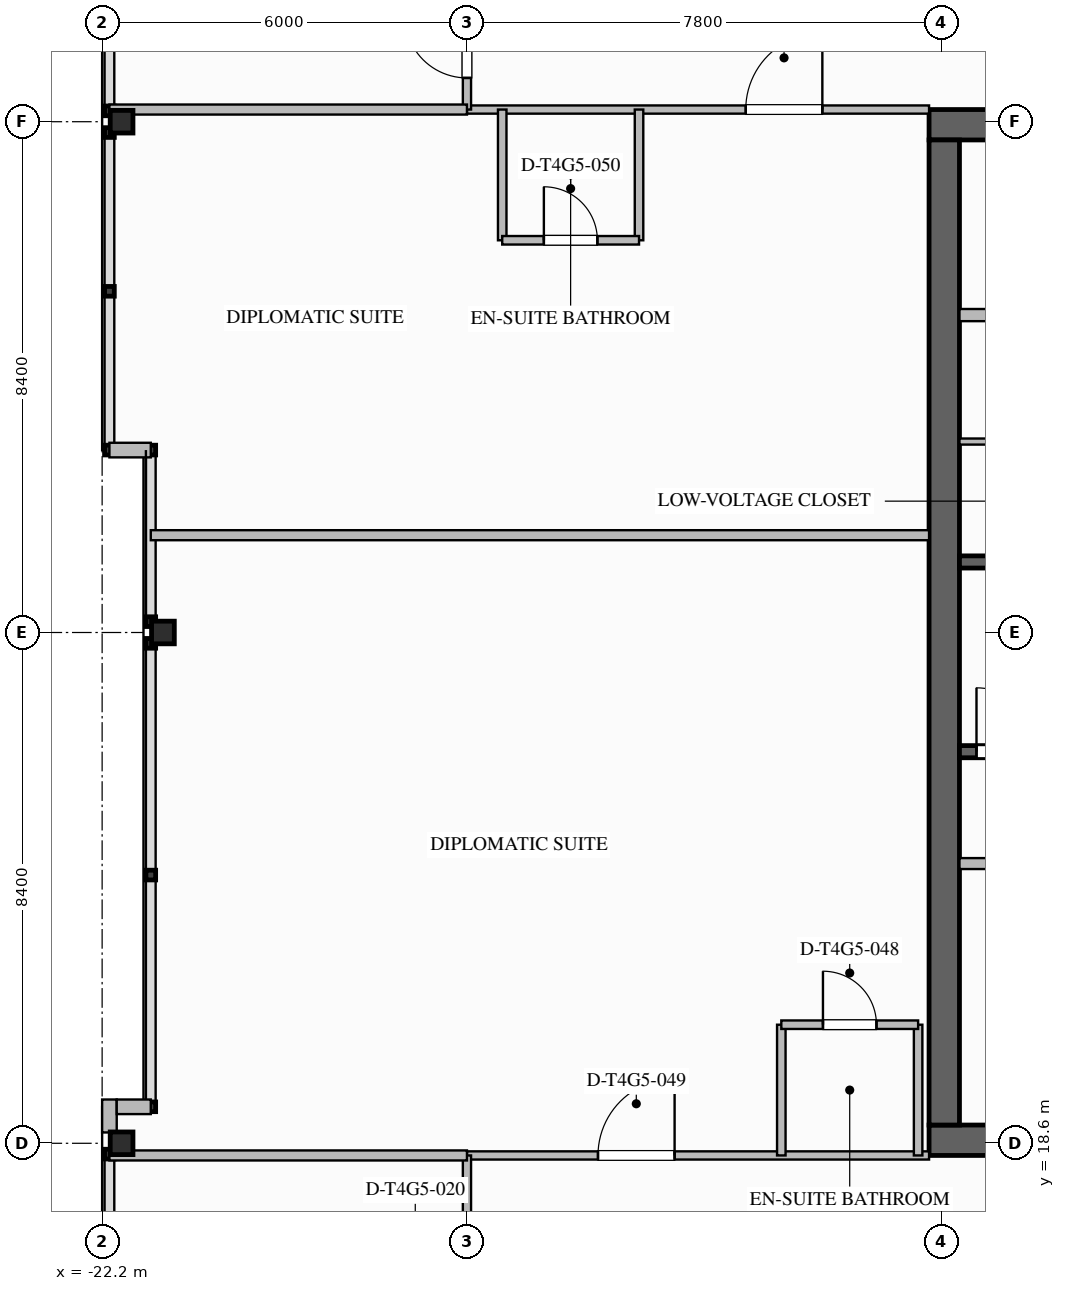
"""IFC4 building model, lengths in metres.
Left out: names, types, materials, properties, quantities, classifications, styles, units other than length and angle.
Written with IfcOpenShell. Run it as: python <this file> out.ifc"""

import sys

from ifc_helpers import new_model, si_unit, direction, frame, frame_2d, origin, origin_2d, place, context, subcontext, project, spatial, rectangle, i_section, extrude, element, fill, save


model = new_model("IFC4")
c1 = context("Model", 3, precision=1e-05, world=origin(), true_north=direction((0.0, 1.0)))
c2 = subcontext(c1, "Body", "Model", "MODEL_VIEW")
j1 = project(units=[si_unit("LENGTHUNIT", "METRE"), si_unit("PLANEANGLEUNIT", "RADIAN")], contexts=[c1])
p1 = place(None, origin())
s1 = spatial("IfcSite", under=j1, at=p1, CompositionType="ELEMENT")
p2 = place(p1, origin())
s2 = spatial("IfcBuilding", under=s1, at=p2, CompositionType="ELEMENT")
p3 = place(p2, frame((0.0, 0.0, 248.3)))
s3 = spatial("IfcBuildingStorey", under=s2, at=p3, CompositionType="ELEMENT", Elevation=248.3)
for number, where, z_axis, x_axis in (
    (1, (-8.6, 35.35, 0.0), (0.0, 0.0, 1.0), (1.0, 0.0, 0.0)),
    (2, (8.6, 18.65, 0.0), (0.0, 0.0, 1.0), (-1.0, 0.0, 0.0)),
):
    element("IfcWall", number, at=place(p3, frame(where, z_axis=z_axis, x_axis=x_axis)), inside=s3, PredefinedType="SHEAR", context=c2, shape_type="SweptSolid", body=[
        extrude(rectangle(XDim=17.2, YDim=0.5, at=frame_2d((8.6, 0.0))), origin(), (0.0, 0.0, 1.0), 3.6),
    ])
p4 = place(p3, frame((-8.35, 18.9, 0.0), z_axis=(0.0, 0.0, 1.0), x_axis=(0.0, 1.0, 0.0)))
e3 = element("IfcWall", 3, at=p4, inside=s3, PredefinedType="SHEAR", context=c2, shape_type="SweptSolid", body=[
    extrude(rectangle(XDim=16.2, YDim=0.5, at=frame_2d((8.1, 0.0))), origin(), (0.0, 0.0, 1.0), 3.6),
])
for number, where, z_axis, x_axis in (
    (4, (-21.88, 18.6, 0.0), (0.0, 0.0, 1.0), (1.0, 0.0, 0.0)),
    (5, (-21.2, 27.0, 0.0), (0.0, 0.0, 1.0), (1.0, 0.0, 0.0)),
    (6, (-21.88, 35.4, 0.0), (0.0, 0.0, 1.0), (1.0, 0.0, 0.0)),
):
    element("IfcColumn", number, at=place(p3, frame(where, z_axis=z_axis, x_axis=x_axis)), inside=s3, PredefinedType="COLUMN", context=c2, shape_type="SweptSolid", body=[
        extrude(i_section(OverallWidth=0.374, OverallDepth=0.372, WebThickness=0.016, FlangeThickness=0.026, FilletRadius=0.025, at=origin_2d()), origin(), (0.0, 0.0, 1.0), 3.597),
    ])
p5 = place(p3, frame((-22.08, 18.778, 0.0), z_axis=(0.0, 0.0, 1.0), x_axis=(0.0, 1.0, 0.0)))
e7 = element("IfcWall", 7, at=p5, inside=s3, PredefinedType="STANDARD", context=c2, shape_type="SweptSolid", body=[
    extrude(rectangle(XDim=0.542, YDim=0.24, at=frame_2d((0.271, 0.0))), origin(), (0.0, 0.0, 1.0), 3.34),
])
p6 = place(p3, frame((-21.96, 19.2, 0.0), z_axis=(0.0, 0.0, 1.0), x_axis=(1.0, 0.0, 0.0)))
e8 = element("IfcWall", 8, at=p6, inside=s3, PredefinedType="STANDARD", context=c2, shape_type="SweptSolid", body=[
    extrude(rectangle(XDim=0.56, YDim=0.24, at=frame_2d((0.28, 0.0))), origin(), (0.0, 0.0, 1.0), 3.34),
])
p7 = place(p3, frame((-21.4, 30.0, 0.0), z_axis=(0.0, 0.0, 1.0), x_axis=(-1.0, 0.0, 0.0)))
e9 = element("IfcWall", 9, at=p7, inside=s3, PredefinedType="STANDARD", context=c2, shape_type="SweptSolid", body=[
    extrude(rectangle(XDim=0.68, YDim=0.24, at=frame_2d((0.34, 0.0))), origin(), (0.0, 0.0, 1.0), 3.34),
])
p8 = place(p3, frame((-8.1, 25.04, 0.0), z_axis=(0.0, 0.0, 1.0), x_axis=(1.0, 0.0, 0.0)))
e10 = element("IfcWall", 10, at=p8, inside=s3, PredefinedType="SOLIDWALL", context=c2, shape_type="SweptSolid", body=[
    extrude(rectangle(XDim=8.1, YDim=0.2, at=frame_2d((4.05, 0.0))), origin(), (0.0, 0.0, 1.0), 3.34),
])
p9 = place(p8, frame((0.28, 0.0, 0.0)))
e11 = element("IfcOpeningElement", 11, at=p9, cuts=e10, PredefinedType="OPENING", context=c2, shape_type="SweptSolid", body=[
    extrude(rectangle(XDim=1.05, YDim=2.1, at=frame_2d((0.525, 1.05))), frame((0.0, 0.11, 0.0), z_axis=(0.0, -1.0, 0.0), x_axis=(1.0, 0.0, 0.0)), (0.0, 0.0, 1.0), 0.22),
])
p10 = place(p3, frame((-8.1, 28.16, 0.0), z_axis=(0.0, 0.0, 1.0), x_axis=(1.0, 0.0, 0.0)))
e12 = element("IfcWall", 12, at=p10, inside=s3, PredefinedType="SOLIDWALL", context=c2, shape_type="SweptSolid", body=[
    extrude(rectangle(XDim=8.1, YDim=0.2, at=frame_2d((4.05, 0.0))), origin(), (0.0, 0.0, 1.0), 3.34),
])
p11 = place(p3, frame((-8.1, 32.22, 0.0), z_axis=(0.0, 0.0, 1.0), x_axis=(1.0, 0.0, 0.0)))
e13 = element("IfcWall", 13, at=p11, inside=s3, PredefinedType="SOLIDWALL", context=c2, shape_type="SweptSolid", body=[
    extrude(rectangle(XDim=7.1, YDim=0.2, at=frame_2d((3.55, 0.0))), origin(), (0.0, 0.0, 1.0), 3.34),
])
p12 = place(p11, frame((0.95, 0.0, 0.0)))
e14 = element("IfcOpeningElement", 14, at=p12, cuts=e13, PredefinedType="OPENING", context=c2, shape_type="SweptSolid", body=[
    extrude(rectangle(XDim=1.1, YDim=2.2, at=frame_2d((0.55, 1.1))), frame((0.0, 0.11, 0.0), z_axis=(0.0, -1.0, 0.0), x_axis=(1.0, 0.0, 0.0)), (0.0, 0.0, 1.0), 0.22),
])
p13 = place(p11, frame((3.27, 0.0, 0.0)))
e15 = element("IfcOpeningElement", 15, at=p13, cuts=e13, PredefinedType="OPENING", context=c2, shape_type="SweptSolid", body=[
    extrude(rectangle(XDim=1.1, YDim=2.2, at=frame_2d((0.55, 1.1))), frame((0.0, 0.11, 0.0), z_axis=(0.0, -1.0, 0.0), x_axis=(1.0, 0.0, 0.0)), (0.0, 0.0, 1.0), 0.22),
])
p14 = place(p11, frame((5.59, 0.0, 0.0)))
e16 = element("IfcOpeningElement", 16, at=p14, cuts=e13, PredefinedType="OPENING", context=c2, shape_type="SweptSolid", body=[
    extrude(rectangle(XDim=1.1, YDim=2.2, at=frame_2d((0.55, 1.1))), frame((0.0, 0.11, 0.0), z_axis=(0.0, -1.0, 0.0), x_axis=(1.0, 0.0, 0.0)), (0.0, 0.0, 1.0), 0.22),
])
p15 = place(p3, frame((-8.1, 30.14, 0.0), z_axis=(0.0, 0.0, 1.0), x_axis=(1.0, 0.0, 0.0)))
e17 = element("IfcWall", 17, at=p15, inside=s3, PredefinedType="PARTITIONING", context=c2, shape_type="SweptSolid", body=[
    extrude(rectangle(XDim=7.1, YDim=0.1, at=frame_2d((3.55, 0.0))), origin(), (0.0, 0.0, 1.0), 3.34),
])
p16 = place(p15, frame((0.55, 0.0, 0.0)))
e18 = element("IfcOpeningElement", 18, at=p16, cuts=e17, PredefinedType="OPENING", context=c2, shape_type="SweptSolid", body=[
    extrude(rectangle(XDim=0.88, YDim=2.1, at=frame_2d((0.44, 1.05))), frame((0.0, 0.06, 0.0), z_axis=(0.0, -1.0, 0.0), x_axis=(1.0, 0.0, 0.0)), (0.0, 0.0, 1.0), 0.12),
])
p17 = place(p15, frame((3.6, 0.0, 0.0)))
e19 = element("IfcOpeningElement", 19, at=p17, cuts=e17, PredefinedType="OPENING", context=c2, shape_type="SweptSolid", body=[
    extrude(rectangle(XDim=0.92, YDim=2.1, at=frame_2d((0.46, 1.05))), frame((0.0, 0.06, 0.0), z_axis=(0.0, -1.0, 0.0), x_axis=(1.0, 0.0, 0.0)), (0.0, 0.0, 1.0), 0.12),
])
p18 = place(p3, frame((-8.1, 23.2, 0.0), z_axis=(0.0, 0.0, 1.0), x_axis=(1.0, 0.0, 0.0)))
e20 = element("IfcWall", 20, at=p18, inside=s3, PredefinedType="SOLIDWALL", context=c2, shape_type="SweptSolid", body=[
    extrude(rectangle(XDim=16.2, YDim=0.18, at=frame_2d((8.1, 0.0))), origin(), (0.0, 0.0, 1.0), 3.34),
])
p19 = place(p18, frame((1.4, 0.0, 0.0)))
e21 = element("IfcOpeningElement", 21, at=p19, cuts=e20, PredefinedType="OPENING", context=c2, shape_type="SweptSolid", body=[
    extrude(rectangle(XDim=1.0, YDim=2.1, at=frame_2d((0.5, 1.05))), frame((0.0, 0.1, 0.0), z_axis=(0.0, -1.0, 0.0), x_axis=(1.0, 0.0, 0.0)), (0.0, 0.0, 1.0), 0.2),
])
p20 = place(p18, frame((5.6, 0.0, 0.0)))
e22 = element("IfcOpeningElement", 22, at=p20, cuts=e20, PredefinedType="OPENING", context=c2, shape_type="SweptSolid", body=[
    extrude(rectangle(XDim=1.0, YDim=2.1, at=frame_2d((0.5, 1.05))), frame((0.0, 0.1, 0.0), z_axis=(0.0, -1.0, 0.0), x_axis=(1.0, 0.0, 0.0)), (0.0, 0.0, 1.0), 0.2),
])
p21 = place(p18, frame((9.8, 0.0, 0.0)))
e23 = element("IfcOpeningElement", 23, at=p21, cuts=e20, PredefinedType="OPENING", context=c2, shape_type="SweptSolid", body=[
    extrude(rectangle(XDim=0.92, YDim=2.1, at=frame_2d((0.46, 1.05))), frame((0.0, 0.1, 0.0), z_axis=(0.0, -1.0, 0.0), x_axis=(1.0, 0.0, 0.0)), (0.0, 0.0, 1.0), 0.2),
])
p22 = place(p18, frame((13.8, 0.0, 0.0)))
e24 = element("IfcOpeningElement", 24, at=p22, cuts=e20, PredefinedType="OPENING", context=c2, shape_type="SweptSolid", body=[
    extrude(rectangle(XDim=1.0, YDim=2.1, at=frame_2d((0.5, 1.05))), frame((0.0, 0.1, 0.0), z_axis=(0.0, -1.0, 0.0), x_axis=(1.0, 0.0, 0.0)), (0.0, 0.0, 1.0), 0.2),
])
p23 = place(p3, frame((-16.2, 18.4, 0.0), z_axis=(0.0, 0.0, 1.0), x_axis=(1.0, 0.0, 0.0)))
e25 = element("IfcWall", 25, at=p23, inside=s3, PredefinedType="PARTITIONING", context=c2, shape_type="SweptSolid", body=[
    extrude(rectangle(XDim=7.6, YDim=0.135, at=frame_2d((3.8, 0.0))), origin(), (0.0, 0.0, 1.0), 2.717),
])
p24 = place(p23, frame((2.155, 0.0, 0.0)))
e26 = element("IfcOpeningElement", 26, at=p24, cuts=e25, PredefinedType="OPENING", context=c2, shape_type="SweptSolid", body=[
    extrude(rectangle(XDim=1.26, YDim=2.2, at=frame_2d((0.63, 1.1))), frame((0.0, 0.077, 0.0), z_axis=(0.0, -1.0, 0.0), x_axis=(1.0, 0.0, 0.0)), (0.0, 0.0, 1.0), 0.155),
])
p25 = place(p3, frame((-16.2, 35.6, 0.0), z_axis=(0.0, 0.0, 1.0), x_axis=(1.0, 0.0, 0.0)))
e27 = element("IfcWall", 27, at=p25, inside=s3, PredefinedType="PARTITIONING", context=c2, shape_type="SweptSolid", body=[
    extrude(rectangle(XDim=7.6, YDim=0.135, at=frame_2d((3.8, 0.0))), origin(), (0.0, 0.0, 1.0), 2.717),
])
p26 = place(p25, frame((4.585, 0.0, 0.0)))
e28 = element("IfcOpeningElement", 28, at=p26, cuts=e27, PredefinedType="OPENING", context=c2, shape_type="SweptSolid", body=[
    extrude(rectangle(XDim=1.26, YDim=2.2, at=frame_2d((0.63, 1.1))), frame((0.0, 0.077, 0.0), z_axis=(0.0, -1.0, 0.0), x_axis=(1.0, 0.0, 0.0)), (0.0, 0.0, 1.0), 0.155),
])
p27 = place(p3, frame((-16.2, 15.8, 0.0), z_axis=(0.0, 0.0, 1.0), x_axis=(0.0, 1.0, 0.0)))
e29 = element("IfcWall", 29, at=p27, inside=s3, PredefinedType="PARTITIONING", context=c2, shape_type="SweptSolid", body=[
    extrude(rectangle(XDim=2.6, YDim=0.135, at=frame_2d((1.3, 0.0))), origin(), (0.0, 0.0, 1.0), 2.714),
])
p28 = place(p27, frame((0.52, 0.0, 0.0)))
e30 = element("IfcOpeningElement", 30, at=p28, cuts=e29, PredefinedType="OPENING", context=c2, shape_type="SweptSolid", body=[
    extrude(rectangle(XDim=1.02, YDim=2.15, at=frame_2d((0.51, 1.075))), frame((0.0, 0.077, 0.0), z_axis=(0.0, -1.0, 0.0), x_axis=(1.0, 0.0, 0.0)), (0.0, 0.0, 1.0), 0.155),
])
p29 = place(p3, frame((-16.2, 35.6, 0.0), z_axis=(0.0, 0.0, 1.0), x_axis=(0.0, 1.0, 0.0)))
e31 = element("IfcWall", 31, at=p29, inside=s3, PredefinedType="PARTITIONING", context=c2, shape_type="SweptSolid", body=[
    extrude(rectangle(XDim=2.6, YDim=0.135, at=frame_2d((1.3, 0.0))), origin(), (0.0, 0.0, 1.0), 2.714),
])
p30 = place(p29, frame((0.52, 0.0, 0.0)))
e32 = element("IfcOpeningElement", 32, at=p30, cuts=e31, PredefinedType="OPENING", context=c2, shape_type="SweptSolid", body=[
    extrude(rectangle(XDim=1.02, YDim=2.15, at=frame_2d((0.51, 1.075))), frame((0.0, 0.077, 0.0), z_axis=(0.0, -1.0, 0.0), x_axis=(1.0, 0.0, 0.0)), (0.0, 0.0, 1.0), 0.155),
])
for number, where, z_axis, x_axis in (
    (33, (-22.08, 18.4, 0.0), (0.0, 0.0, 1.0), (1.0, 0.0, 0.0)),
    (34, (-22.08, 35.6, 0.0), (0.0, 0.0, 1.0), (1.0, 0.0, 0.0)),
):
    element("IfcWall", number, at=place(p3, frame(where, z_axis=z_axis, x_axis=x_axis)), inside=s3, PredefinedType="PARTITIONING", context=c2, shape_type="SweptSolid", body=[
        extrude(rectangle(XDim=5.88, YDim=0.165, at=frame_2d((2.94, 0.0))), origin(), (0.0, 0.0, 1.0), 2.714),
    ])
p31 = place(p3, frame((-21.4, 28.6, 0.0), z_axis=(0.0, 0.0, 1.0), x_axis=(1.0, 0.0, 0.0)))
e35 = element("IfcWall", 35, at=p31, inside=s3, PredefinedType="PARTITIONING", context=c2, shape_type="SweptSolid", body=[
    extrude(rectangle(XDim=12.8, YDim=0.165, at=frame_2d((6.4, 0.0))), origin(), (0.0, 0.0, 1.0), 3.34),
])
for number, where, z_axis, x_axis in (
    (36, (-11.03, 18.4, 0.0), (0.0, 0.0, 1.0), (0.0, 1.0, 0.0)),
    (37, (-8.78, 18.4, 0.0), (0.0, 0.0, 1.0), (0.0, 1.0, 0.0)),
):
    element("IfcWall", number, at=place(p3, frame(where, z_axis=z_axis, x_axis=x_axis)), inside=s3, PredefinedType="PLUMBINGWALL", context=c2, shape_type="SweptSolid", body=[
        extrude(rectangle(XDim=2.15, YDim=0.14, at=frame_2d((1.075, 0.0))), origin(), (0.0, 0.0, 1.0), 3.34),
    ])
p32 = place(p3, frame((-11.03, 20.55, 0.0), z_axis=(0.0, 0.0, 1.0), x_axis=(1.0, 0.0, 0.0)))
e38 = element("IfcWall", 38, at=p32, inside=s3, PredefinedType="PLUMBINGWALL", context=c2, shape_type="SweptSolid", body=[
    extrude(rectangle(XDim=2.25, YDim=0.14, at=frame_2d((1.125, 0.0))), origin(), (0.0, 0.0, 1.0), 3.34),
])
p33 = place(p32, frame((0.685, 0.0, 0.0)))
e39 = element("IfcOpeningElement", 39, at=p33, cuts=e38, PredefinedType="OPENING", context=c2, shape_type="SweptSolid", body=[
    extrude(rectangle(XDim=0.88, YDim=2.1, at=frame_2d((0.44, 1.05))), frame((0.0, 0.08, 0.0), z_axis=(0.0, -1.0, 0.0), x_axis=(1.0, 0.0, 0.0)), (0.0, 0.0, 1.0), 0.16),
])
for number, where, z_axis, x_axis in (
    (40, (-15.62, 35.6, 0.0), (0.0, 0.0, 1.0), (0.0, -1.0, 0.0)),
    (41, (-13.37, 35.6, 0.0), (0.0, 0.0, 1.0), (0.0, -1.0, 0.0)),
):
    element("IfcWall", number, at=place(p3, frame(where, z_axis=z_axis, x_axis=x_axis)), inside=s3, PredefinedType="PLUMBINGWALL", context=c2, shape_type="SweptSolid", body=[
        extrude(rectangle(XDim=2.15, YDim=0.14, at=frame_2d((1.075, 0.0))), origin(), (0.0, 0.0, 1.0), 3.34),
    ])
p34 = place(p3, frame((-15.62, 33.45, 0.0), z_axis=(0.0, 0.0, 1.0), x_axis=(1.0, 0.0, 0.0)))
e42 = element("IfcWall", 42, at=p34, inside=s3, PredefinedType="PLUMBINGWALL", context=c2, shape_type="SweptSolid", body=[
    extrude(rectangle(XDim=2.25, YDim=0.14, at=frame_2d((1.125, 0.0))), origin(), (0.0, 0.0, 1.0), 3.34),
])
p35 = place(p34, frame((0.685, 0.0, 0.0)))
e43 = element("IfcOpeningElement", 43, at=p35, cuts=e42, PredefinedType="OPENING", context=c2, shape_type="SweptSolid", body=[
    extrude(rectangle(XDim=0.88, YDim=2.1, at=frame_2d((0.44, 1.05))), frame((0.0, 0.08, 0.0), z_axis=(0.0, -1.0, 0.0), x_axis=(1.0, 0.0, 0.0)), (0.0, 0.0, 1.0), 0.16),
])
p36 = place(p9, origin())
e44 = element("IfcDoor", 44, at=p36, inside=s3, OperationType="SINGLE_SWING_LEFT", PredefinedType="DOOR", context=c2, shape_type="SweptSolid", body=[
    extrude(rectangle(XDim=1.05, YDim=2.1, at=frame_2d((0.525, 1.05))), frame((0.0, 0.025, 0.0), z_axis=(0.0, -1.0, 0.0), x_axis=(1.0, 0.0, 0.0)), (0.0, 0.0, 1.0), 0.05),
])
fill(e11, e44)
p37 = place(p30, origin())
e45 = element("IfcDoor", 45, at=p37, inside=s3, OperationType="SINGLE_SWING_RIGHT", PredefinedType="DOOR", context=c2, shape_type="SweptSolid", body=[
    extrude(rectangle(XDim=1.02, YDim=2.15, at=frame_2d((0.51, 1.075))), frame((0.0, 0.025, 0.0), z_axis=(0.0, -1.0, 0.0), x_axis=(1.0, 0.0, 0.0)), (0.0, 0.0, 1.0), 0.05),
])
fill(e32, e45)
p38 = place(p33, origin())
e46 = element("IfcDoor", 46, at=p38, inside=s3, OperationType="SINGLE_SWING_LEFT", PredefinedType="DOOR", context=c2, shape_type="SweptSolid", body=[
    extrude(rectangle(XDim=0.88, YDim=2.1, at=frame_2d((0.44, 1.05))), frame((0.0, 0.025, 0.0), z_axis=(0.0, -1.0, 0.0), x_axis=(1.0, 0.0, 0.0)), (0.0, 0.0, 1.0), 0.05),
])
fill(e39, e46)
p39 = place(p24, origin())
e47 = element("IfcDoor", 47, at=p39, inside=s3, OperationType="SINGLE_SWING_RIGHT", PredefinedType="DOOR", context=c2, shape_type="SweptSolid", body=[
    extrude(rectangle(XDim=1.26, YDim=2.2, at=frame_2d((0.63, 1.1))), frame((0.0, 0.025, 0.0), z_axis=(0.0, -1.0, 0.0), x_axis=(1.0, 0.0, 0.0)), (0.0, 0.0, 1.0), 0.05),
])
fill(e26, e47)
p40 = place(p35, origin())
e48 = element("IfcDoor", 48, at=p40, inside=s3, OperationType="SINGLE_SWING_LEFT", PredefinedType="DOOR", context=c2, shape_type="SweptSolid", body=[
    extrude(rectangle(XDim=0.88, YDim=2.1, at=frame_2d((0.44, 1.05))), frame((0.0, 0.025, 0.0), z_axis=(0.0, -1.0, 0.0), x_axis=(1.0, 0.0, 0.0)), (0.0, 0.0, 1.0), 0.05),
])
fill(e43, e48)
p41 = place(p26, origin())
e49 = element("IfcDoor", 49, at=p41, inside=s3, OperationType="SINGLE_SWING_RIGHT", PredefinedType="DOOR", context=c2, shape_type="SweptSolid", body=[
    extrude(rectangle(XDim=1.26, YDim=2.2, at=frame_2d((0.63, 1.1))), frame((0.0, 0.025, 0.0), z_axis=(0.0, -1.0, 0.0), x_axis=(1.0, 0.0, 0.0)), (0.0, 0.0, 1.0), 0.05),
])
fill(e28, e49)
save(model, sys.argv[1])
